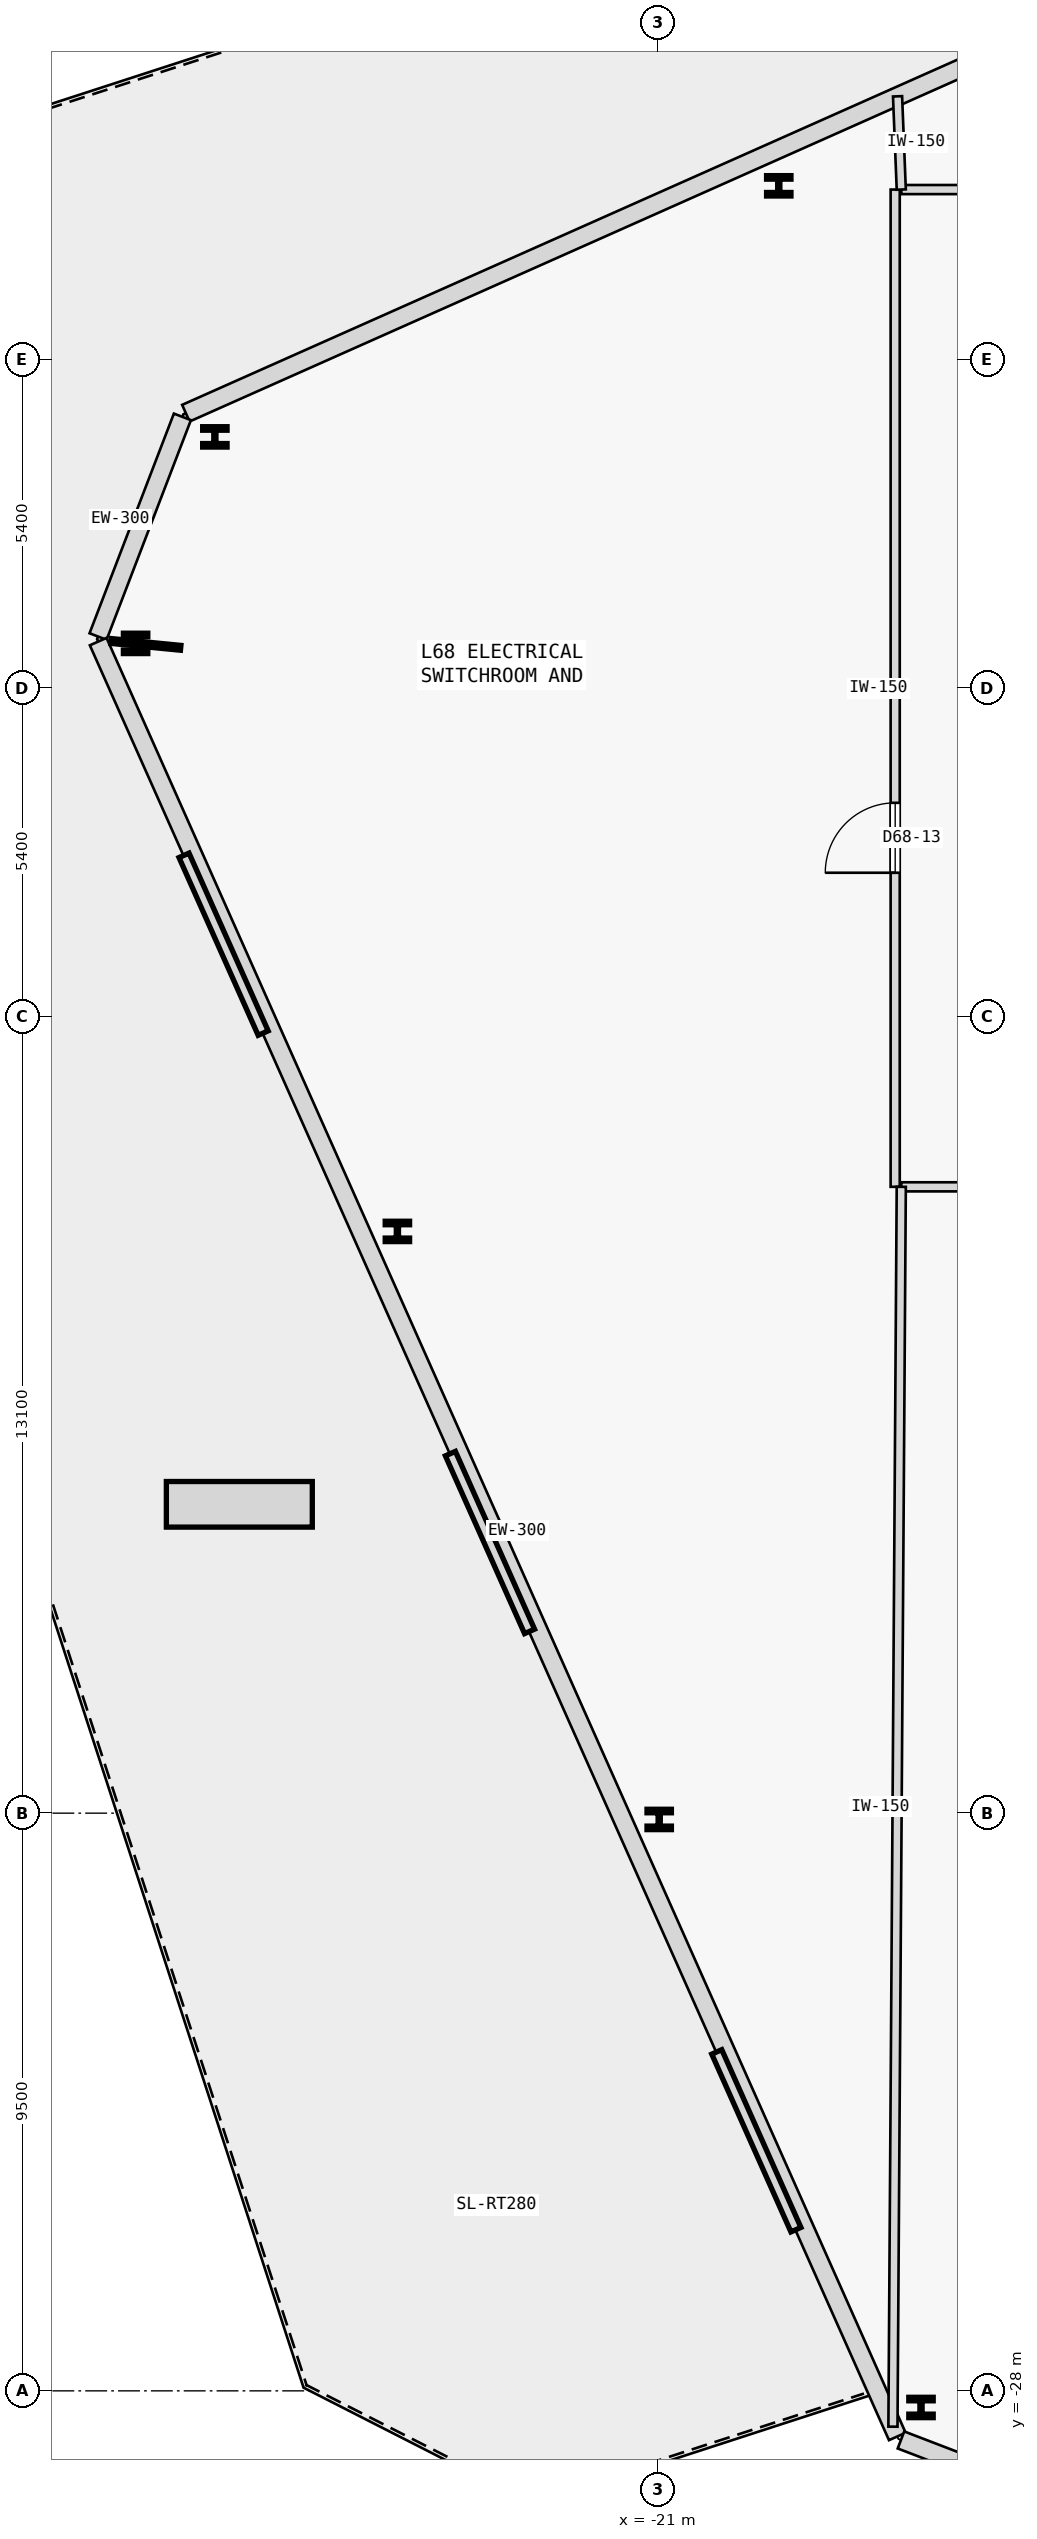
"""IFC4 building model, lengths in metres.
Left out: names, types, materials, properties, quantities, classifications, styles, units other than length and angle.
Written with IfcOpenShell. Run it as: python <this file> out.ifc"""

import sys

from ifc_helpers import new_model, si_unit, direction, frame, frame_2d, origin, origin_2d, place, context, subcontext, project, spatial, rectangle, i_section, extrude, element, fill, save


model = new_model("IFC4")
c1 = context("Model", 3, precision=1e-05, world=origin(), true_north=direction((0.0, 1.0)))
c2 = subcontext(c1, "Body", "Model", "MODEL_VIEW")
j1 = project(units=[si_unit("LENGTHUNIT", "METRE"), si_unit("PLANEANGLEUNIT", "RADIAN")], contexts=[c1])
p1 = place(None, origin())
s1 = spatial("IfcSite", under=j1, at=p1, CompositionType="ELEMENT")
p2 = place(p1, origin())
s2 = spatial("IfcBuilding", under=s1, at=p2, CompositionType="ELEMENT")
p3 = place(p2, frame((0.0, 0.0, 254.45)))
s3 = spatial("IfcBuildingStorey", under=s2, at=p3, CompositionType="ELEMENT", Elevation=254.45)
for number, where, z_axis, x_axis in (
    (1, (-19.015, 8.262, 0.0), (0.0, 0.0, 1.0), (1.0, 0.0, 0.0)),
    (2, (-28.288, 4.133, 0.0), (0.0, 0.0, 1.0), (1.0, 0.0, 0.0)),
    (3, (-29.592, 0.737, 0.0), (0.0, 0.0, 1.0), (1.0, 0.0, 0.0)),
    (4, (-25.286, -8.933, 0.0), (0.0, 0.0, 1.0), (1.0, 0.0, 0.0)),
    (5, (-20.981, -18.603, 0.0), (0.0, 0.0, 1.0), (1.0, 0.0, 0.0)),
    (6, (-16.676, -28.273, 0.0), (0.0, 0.0, 1.0), (1.0, 0.0, 0.0)),
):
    element("IfcColumn", number, at=place(p3, frame(where, z_axis=z_axis, x_axis=x_axis)), inside=s3, PredefinedType="COLUMN", context=c2, shape_type="SweptSolid", body=[
        extrude(i_section(OverallWidth=0.401, OverallDepth=0.335, WebThickness=0.036, FlangeThickness=0.058, FilletRadius=0.015, at=origin_2d()), origin(), (0.0, 0.0, 1.0), 4.4),
    ])
p4 = place(p3, frame((18.109, 25.392, 0.0), z_axis=(0.0, 0.0, 1.0), x_axis=(-0.913544894419, -0.406737908095, 0.0)))
e7 = element("IfcWall", 7, at=p4, inside=s3, PredefinedType="STANDARD", context=c2, shape_type="SweptSolid", body=[
    extrude(rectangle(XDim=51.31, YDim=0.3, at=frame_2d((25.655, 0.0))), origin(), (0.0, 0.0, 1.0), 4.175),
])
p5 = place(p4, frame((27.87, 0.0, 0.0)))
e8 = element("IfcOpeningElement", 8, at=p5, cuts=e7, PredefinedType="OPENING", context=c2, shape_type="SweptSolid", body=[
    extrude(rectangle(XDim=1.1, YDim=2.2, at=frame_2d((0.55, 1.1))), frame((0.0, 0.16, 0.0), z_axis=(0.0, -1.0, 0.0), x_axis=(1.0, 0.0, 0.0)), (0.0, 0.0, 1.0), 0.32),
])
p6 = place(p3, frame((-28.822, 4.462, 0.0), z_axis=(0.0, 0.0, 1.0), x_axis=(-0.358365962961, -0.933581189073, 0.0)))
e9 = element("IfcWall", 9, at=p6, inside=s3, PredefinedType="STANDARD", context=c2, shape_type="SweptSolid", body=[
    extrude(rectangle(XDim=3.87, YDim=0.3, at=frame_2d((1.935, 0.0))), origin(), (0.0, 0.0, 1.0), 4.175),
])
p7 = place(p3, frame((-30.207, 0.766, 0.0), z_axis=(0.0, 0.0, 1.0), x_axis=(0.406735709426, -0.91354587333, 0.0)))
e10 = element("IfcWall", 10, at=p7, inside=s3, PredefinedType="STANDARD", context=c2, shape_type="SweptSolid", body=[
    extrude(rectangle(XDim=32.31, YDim=0.3, at=frame_2d((16.155, 0.0))), origin(), (0.0, 0.0, 1.0), 4.175),
])
p8 = place(p3, frame((-17.005, -28.808, 0.0), z_axis=(0.0, 0.0, 1.0), x_axis=(0.933589291098, -0.358344855618, 0.0)))
e11 = element("IfcWall", 11, at=p8, inside=s3, PredefinedType="STANDARD", context=c2, shape_type="SweptSolid", body=[
    extrude(rectangle(XDim=3.87, YDim=0.3, at=frame_2d((1.935, 0.0))), origin(), (0.0, 0.0, 1.0), 4.175),
])
p9 = place(p3, frame((-17.0, 8.2, 0.0), z_axis=(0.0, 0.0, 1.0), x_axis=(1.0, 0.0, 0.0)))
e12 = element("IfcWall", 12, at=p9, inside=s3, PredefinedType="PARTITIONING", context=c2, shape_type="SweptSolid", body=[
    extrude(rectangle(XDim=12.3, YDim=0.15, at=frame_2d((6.15, 0.0))), origin(), (0.0, 0.0, 1.0), 4.175),
])
p10 = place(p9, frame((5.575, 0.0, 0.0)))
e13 = element("IfcOpeningElement", 13, at=p10, cuts=e12, PredefinedType="OPENING", context=c2, shape_type="SweptSolid", body=[
    extrude(rectangle(XDim=1.15, YDim=2.15, at=frame_2d((0.575, 1.075))), frame((0.0, 0.085, 0.0), z_axis=(0.0, -1.0, 0.0), x_axis=(1.0, 0.0, 0.0)), (0.0, 0.0, 1.0), 0.17),
])
p11 = place(p3, frame((-17.0, -8.2, 0.0), z_axis=(0.0, 0.0, 1.0), x_axis=(1.0, 0.0, 0.0)))
e14 = element("IfcWall", 14, at=p11, inside=s3, PredefinedType="PARTITIONING", context=c2, shape_type="SweptSolid", body=[
    extrude(rectangle(XDim=22.2, YDim=0.15, at=frame_2d((11.1, 0.0))), origin(), (0.0, 0.0, 1.0), 4.175),
])
p12 = place(p11, frame((10.525, 0.0, 0.0)))
e15 = element("IfcOpeningElement", 15, at=p12, cuts=e14, PredefinedType="OPENING", context=c2, shape_type="SweptSolid", body=[
    extrude(rectangle(XDim=1.15, YDim=2.15, at=frame_2d((0.575, 1.075))), frame((0.0, 0.085, 0.0), z_axis=(0.0, -1.0, 0.0), x_axis=(1.0, 0.0, 0.0)), (0.0, 0.0, 1.0), 0.17),
])
p13 = place(p3, frame((-17.1, -8.2, 0.0), z_axis=(0.0, 0.0, 1.0), x_axis=(0.0, 1.0, 0.0)))
e16 = element("IfcWall", 16, at=p13, inside=s3, PredefinedType="PARTITIONING", context=c2, shape_type="SweptSolid", body=[
    extrude(rectangle(XDim=16.4, YDim=0.15, at=frame_2d((8.2, 0.0))), origin(), (0.0, 0.0, 1.0), 4.175),
])
p14 = place(p13, frame((5.165, 0.0, 0.0)))
e17 = element("IfcOpeningElement", 17, at=p14, cuts=e16, PredefinedType="OPENING", context=c2, shape_type="SweptSolid", body=[
    extrude(rectangle(XDim=1.15, YDim=2.15, at=frame_2d((0.575, 1.075))), frame((0.0, 0.085, 0.0), z_axis=(0.0, -1.0, 0.0), x_axis=(1.0, 0.0, 0.0)), (0.0, 0.0, 1.0), 0.17),
])
p15 = place(p3, frame((-17.0, 8.2, 0.0), z_axis=(0.0, 0.0, 1.0), x_axis=(-0.039929919308, 0.999202482755, 0.0)))
e18 = element("IfcWall", 18, at=p15, inside=s3, PredefinedType="PARTITIONING", context=c2, shape_type="SweptSolid", body=[
    extrude(rectangle(XDim=1.535, YDim=0.15, at=frame_2d((0.767, 0.0))), origin(), (0.0, 0.0, 1.0), 4.175),
])
p16 = place(p3, frame((-17.137, -28.589, 0.0), z_axis=(0.0, 0.0, 1.0), x_axis=(0.006717285044, 0.999977438786, 0.0)))
e19 = element("IfcWall", 19, at=p16, inside=s3, PredefinedType="PARTITIONING", context=c2, shape_type="SweptSolid", body=[
    extrude(rectangle(XDim=20.39, YDim=0.15, at=frame_2d((10.195, 0.0))), origin(), (0.0, 0.0, 1.0), 4.175),
])
p17 = place(p14, origin())
e20 = element("IfcDoor", 20, at=p17, inside=s3, OperationType="SINGLE_SWING_LEFT", PredefinedType="DOOR", context=c2, shape_type="SweptSolid", body=[
    extrude(rectangle(XDim=1.15, YDim=2.15, at=frame_2d((0.575, 1.075))), frame((0.0, 0.025, 0.0), z_axis=(0.0, -1.0, 0.0), x_axis=(1.0, 0.0, 0.0)), (0.0, 0.0, 1.0), 0.05),
])
fill(e17, e20)
save(model, sys.argv[1])
